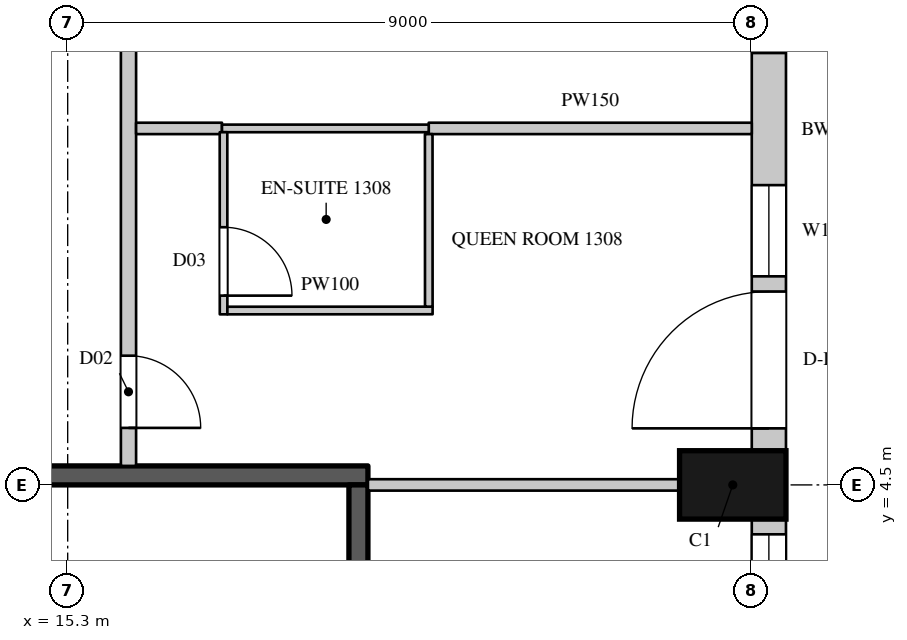
"""IFC4 building model, lengths in metres.
Left out: names, types, materials, properties, quantities, classifications, styles, units other than length and angle.
Written with IfcOpenShell. Run it as: python <this file> out.ifc"""

import sys

from ifc_helpers import new_model, si_unit, direction, frame, frame_2d, origin, origin_2d, place, context, subcontext, project, spatial, rectangle, extrude, element, fill, save


model = new_model("IFC4")
c1 = context("Model", 3, precision=1e-05, world=origin(), true_north=direction((0.0, 1.0)))
c2 = subcontext(c1, "Body", "Model", "MODEL_VIEW")
j1 = project(units=[si_unit("LENGTHUNIT", "METRE"), si_unit("PLANEANGLEUNIT", "RADIAN")], contexts=[c1])
p1 = place(None, origin())
s1 = spatial("IfcSite", under=j1, at=p1, CompositionType="ELEMENT")
p2 = place(p1, origin())
s2 = spatial("IfcBuilding", under=s1, at=p2, CompositionType="ELEMENT")
p3 = place(p2, frame((0.0, 0.0, 77.1)))
s3 = spatial("IfcBuildingStorey", under=s2, at=p3, CompositionType="ELEMENT", Elevation=77.1)
p4 = place(p3, frame((24.05, 4.5, 0.0), z_axis=(0.0, 0.0, 1.0), x_axis=(0.0, 1.0, 0.0)))
e1 = element("IfcColumn", 1, at=p4, inside=s3, PredefinedType="COLUMN", context=c2, shape_type="SweptSolid", body=[
    extrude(rectangle(XDim=0.9, YDim=1.4, at=origin_2d()), origin(), (0.0, 0.0, 1.0), 3.6),
])
p5 = place(p3, frame((24.525, -4.05, 0.0), z_axis=(0.0, 0.0, 1.0), x_axis=(0.0, 1.0, 0.0)))
e2 = element("IfcWall", 2, at=p5, inside=s3, PredefinedType="SOLIDWALL", context=c2, shape_type="SweptSolid", body=[
    extrude(rectangle(XDim=8.1, YDim=0.45, at=frame_2d((4.05, 0.0))), origin(), (0.0, 0.0, 1.0), 3.3),
])
p6 = place(p5, frame((0.2, 0.0, 0.0)))
e3 = element("IfcOpeningElement", 3, at=p6, cuts=e2, PredefinedType="OPENING", context=c2, shape_type="SweptSolid", body=[
    extrude(rectangle(XDim=1.8, YDim=2.4, at=frame_2d((0.9, 1.2))), frame((0.0, 0.235, 0.0), z_axis=(0.0, -1.0, 0.0), x_axis=(1.0, 0.0, 0.0)), (0.0, 0.0, 1.0), 0.47),
])
p7 = place(p5, frame((2.2, 0.0, 1.05)))
e4 = element("IfcOpeningElement", 4, at=p7, cuts=e2, PredefinedType="OPENING", context=c2, shape_type="SweptSolid", body=[
    extrude(rectangle(XDim=1.2, YDim=2.0, at=frame_2d((0.6, 1.0))), frame((0.0, 0.235, 0.0), z_axis=(0.0, -1.0, 0.0), x_axis=(1.0, 0.0, 0.0)), (0.0, 0.0, 1.0), 0.47),
])
p8 = place(p5, frame((4.7, 0.0, 0.0)))
e5 = element("IfcOpeningElement", 5, at=p8, cuts=e2, PredefinedType="OPENING", context=c2, shape_type="SweptSolid", body=[
    extrude(rectangle(XDim=1.8, YDim=2.4, at=frame_2d((0.9, 1.2))), frame((0.0, 0.235, 0.0), z_axis=(0.0, -1.0, 0.0), x_axis=(1.0, 0.0, 0.0)), (0.0, 0.0, 1.0), 0.47),
])
p9 = place(p5, frame((6.7, 0.0, 1.05)))
e6 = element("IfcOpeningElement", 6, at=p9, cuts=e2, PredefinedType="OPENING", context=c2, shape_type="SweptSolid", body=[
    extrude(rectangle(XDim=1.2, YDim=2.0, at=frame_2d((0.6, 1.0))), frame((0.0, 0.235, 0.0), z_axis=(0.0, -1.0, 0.0), x_axis=(1.0, 0.0, 0.0)), (0.0, 0.0, 1.0), 0.47),
])
p10 = place(p3, frame((24.525, 4.95, 0.0), z_axis=(0.0, 0.0, 1.0), x_axis=(0.0, 1.0, 0.0)))
e7 = element("IfcWall", 7, at=p10, inside=s3, PredefinedType="SOLIDWALL", context=c2, shape_type="SweptSolid", body=[
    extrude(rectangle(XDim=8.439, YDim=0.45, at=frame_2d((4.219, 0.0))), origin(), (0.0, 0.0, 1.0), 3.3),
])
p11 = place(p10, frame((0.294, 0.0, 0.0)))
e8 = element("IfcOpeningElement", 8, at=p11, cuts=e7, PredefinedType="OPENING", context=c2, shape_type="SweptSolid", body=[
    extrude(rectangle(XDim=1.8, YDim=2.4, at=frame_2d((0.9, 1.2))), frame((0.0, 0.235, 0.0), z_axis=(0.0, -1.0, 0.0), x_axis=(1.0, 0.0, 0.0)), (0.0, 0.0, 1.0), 0.47),
])
p12 = place(p10, frame((2.294, 0.0, 1.05)))
e9 = element("IfcOpeningElement", 9, at=p12, cuts=e7, PredefinedType="OPENING", context=c2, shape_type="SweptSolid", body=[
    extrude(rectangle(XDim=1.2, YDim=2.0, at=frame_2d((0.6, 1.0))), frame((0.0, 0.235, 0.0), z_axis=(0.0, -1.0, 0.0), x_axis=(1.0, 0.0, 0.0)), (0.0, 0.0, 1.0), 0.47),
])
p13 = place(p10, frame((5.232, 0.0, 1.05)))
e10 = element("IfcOpeningElement", 10, at=p13, cuts=e7, PredefinedType="OPENING", context=c2, shape_type="SweptSolid", body=[
    extrude(rectangle(XDim=2.7, YDim=2.0, at=frame_2d((1.35, 1.0))), frame((0.0, 0.235, 0.0), z_axis=(0.0, -1.0, 0.0), x_axis=(1.0, 0.0, 0.0)), (0.0, 0.0, 1.0), 0.47),
])
p14 = place(p3, frame((16.1, 4.75, 0.0), z_axis=(0.0, 0.0, 1.0), x_axis=(0.0, 1.0, 0.0)))
e11 = element("IfcWall", 11, at=p14, inside=s3, PredefinedType="PARTITIONING", context=c2, shape_type="SweptSolid", body=[
    extrude(rectangle(XDim=12.65, YDim=0.2, at=frame_2d((6.325, 0.0))), origin(), (0.0, 0.0, 1.0), 3.3),
])
p15 = place(p14, frame((0.5, 0.0, 0.0)))
e12 = element("IfcOpeningElement", 12, at=p15, cuts=e11, PredefinedType="OPENING", context=c2, shape_type="SweptSolid", body=[
    extrude(rectangle(XDim=0.95, YDim=2.2, at=frame_2d((0.475, 1.1))), frame((0.0, 0.11, 0.0), z_axis=(0.0, -1.0, 0.0), x_axis=(1.0, 0.0, 0.0)), (0.0, 0.0, 1.0), 0.22),
])
p16 = place(p14, frame((6.9, 0.0, 0.0)))
e13 = element("IfcOpeningElement", 13, at=p16, cuts=e11, PredefinedType="OPENING", context=c2, shape_type="SweptSolid", body=[
    extrude(rectangle(XDim=0.95, YDim=2.2, at=frame_2d((0.475, 1.1))), frame((0.0, 0.11, 0.0), z_axis=(0.0, -1.0, 0.0), x_axis=(1.0, 0.0, 0.0)), (0.0, 0.0, 1.0), 0.22),
])
p17 = place(p3, frame((16.2, 9.19, 0.0), z_axis=(0.0, 0.0, 1.0), x_axis=(1.0, 0.0, 0.0)))
e14 = element("IfcWall", 14, at=p17, inside=s3, PredefinedType="PARTITIONING", context=c2, shape_type="SweptSolid", body=[
    extrude(rectangle(XDim=1.13, YDim=0.15, at=frame_2d((0.565, 0.0))), origin(), (0.0, 0.0, 1.0), 2.65),
])
p18 = place(p3, frame((19.25, 4.5, 0.0), z_axis=(0.0, 0.0, 1.0), x_axis=(1.0, 0.0, 0.0)))
e15 = element("IfcWall", 15, at=p18, inside=s3, PredefinedType="PARTITIONING", context=c2, shape_type="SweptSolid", body=[
    extrude(rectangle(XDim=4.1, YDim=0.15, at=frame_2d((2.05, 0.0))), origin(), (0.0, 0.0, 1.0), 3.3),
])
p19 = place(p3, frame((20.05, 9.19, 0.0), z_axis=(0.0, 0.0, 1.0), x_axis=(1.0, 0.0, 0.0)))
e16 = element("IfcWall", 16, at=p19, inside=s3, PredefinedType="PARTITIONING", context=c2, shape_type="SweptSolid", body=[
    extrude(rectangle(XDim=4.25, YDim=0.15, at=frame_2d((2.125, 0.0))), origin(), (0.0, 0.0, 1.0), 2.65),
])
p20 = place(p3, frame((14.55, 4.625, 0.0), z_axis=(0.0, 0.0, 1.0), x_axis=(1.0, 0.0, 0.0)))
e17 = element("IfcWall", 17, at=p20, inside=s3, PredefinedType="SHEAR", context=c2, shape_type="SweptSolid", body=[
    extrude(rectangle(XDim=4.7, YDim=0.25, at=frame_2d((2.35, 0.0))), origin(), (0.0, 0.0, 1.0), 3.3),
])
p21 = place(p3, frame((19.125, -4.5, 0.0), z_axis=(0.0, 0.0, 1.0), x_axis=(0.0, 1.0, 0.0)))
e18 = element("IfcWall", 18, at=p21, inside=s3, PredefinedType="SHEAR", context=c2, shape_type="SweptSolid", body=[
    extrude(rectangle(XDim=9.0, YDim=0.25, at=frame_2d((4.5, 0.0))), origin(), (0.0, 0.0, 1.0), 3.3),
])
p22 = place(p3, frame((17.33, 9.19, 0.0), z_axis=(0.0, 0.0, 1.0), x_axis=(1.0, 0.0, 0.0)))
e19 = element("IfcWall", 19, at=p22, inside=s3, PredefinedType="PARTITIONING", context=c2, shape_type="SweptSolid", body=[
    extrude(rectangle(XDim=2.72, YDim=0.1, at=frame_2d((1.36, 0.0))), origin(), (0.0, 0.0, 1.0), 2.65),
])
p23 = place(p3, frame((17.35, 9.14, 0.0), z_axis=(0.0, 0.0, 1.0), x_axis=(0.000407580973, -0.999999916939, 0.0)))
e20 = element("IfcWall", 20, at=p23, inside=s3, PredefinedType="PARTITIONING", context=c2, shape_type="SweptSolid", body=[
    extrude(rectangle(XDim=2.396, YDim=0.1, at=frame_2d((1.198, 0.0))), origin(), (0.0, 0.0, 1.0), 3.3),
])
p24 = place(p23, frame((1.25, 0.0, 0.0)))
e21 = element("IfcOpeningElement", 21, at=p24, cuts=e20, PredefinedType="OPENING", context=c2, shape_type="SweptSolid", body=[
    extrude(rectangle(XDim=0.9, YDim=2.2, at=frame_2d((0.45, 1.1))), frame((0.0, 0.06, 0.0), z_axis=(0.0, -1.0, 0.0), x_axis=(1.0, 0.0, 0.0)), (0.0, 0.0, 1.0), 0.12),
])
p25 = place(p3, frame((17.401, 6.794, 0.0), z_axis=(0.0, 0.0, 1.0), x_axis=(0.9999999346, 0.000361663629, 0.0)))
e22 = element("IfcWall", 22, at=p25, inside=s3, PredefinedType="PARTITIONING", context=c2, shape_type="SweptSolid", body=[
    extrude(rectangle(XDim=2.7, YDim=0.1, at=frame_2d((1.35, 0.0))), origin(), (0.0, 0.0, 1.0), 3.3),
])
p26 = place(p3, frame((20.05, 9.115, 0.0), z_axis=(0.0, 0.0, 1.0), x_axis=(0.000430200003, -0.999999907464, 0.0)))
e23 = element("IfcWall", 23, at=p26, inside=s3, PredefinedType="PARTITIONING", context=c2, shape_type="SweptSolid", body=[
    extrude(rectangle(XDim=2.27, YDim=0.1, at=frame_2d((1.135, 0.0))), origin(), (0.0, 0.0, 1.0), 3.3),
])
p27 = place(p9, origin())
e24 = element("IfcWindow", 24, at=p27, inside=s3, PartitioningType="SINGLE_PANEL", PredefinedType="WINDOW", context=c2, shape_type="SweptSolid", body=[
    extrude(rectangle(XDim=1.2, YDim=2.0, at=frame_2d((0.6, 1.0))), frame((0.0, 0.135, 0.0), z_axis=(0.0, -1.0, 0.0), x_axis=(1.0, 0.0, 0.0)), (0.0, 0.0, 1.0), 0.06),
])
fill(e6, e24)
p28 = place(p11, origin())
e25 = element("IfcDoor", 25, at=p28, inside=s3, OperationType="SLIDING_TO_LEFT", PredefinedType="DOOR", context=c2, shape_type="SweptSolid", body=[
    extrude(rectangle(XDim=1.8, YDim=2.4, at=frame_2d((0.9, 1.2))), frame((0.0, 0.13, 0.0), z_axis=(0.0, -1.0, 0.0), x_axis=(1.0, 0.0, 0.0)), (0.0, 0.0, 1.0), 0.05),
])
fill(e8, e25)
p29 = place(p12, origin())
e26 = element("IfcWindow", 26, at=p29, inside=s3, PartitioningType="SINGLE_PANEL", PredefinedType="WINDOW", context=c2, shape_type="SweptSolid", body=[
    extrude(rectangle(XDim=1.2, YDim=2.0, at=frame_2d((0.6, 1.0))), frame((0.0, 0.135, 0.0), z_axis=(0.0, -1.0, 0.0), x_axis=(1.0, 0.0, 0.0)), (0.0, 0.0, 1.0), 0.06),
])
fill(e9, e26)
p30 = place(p13, origin())
e27 = element("IfcWindow", 27, at=p30, inside=s3, PartitioningType="SINGLE_PANEL", PredefinedType="WINDOW", context=c2, shape_type="SweptSolid", body=[
    extrude(rectangle(XDim=2.7, YDim=2.0, at=frame_2d((1.35, 1.0))), frame((0.0, 0.135, 0.0), z_axis=(0.0, -1.0, 0.0), x_axis=(1.0, 0.0, 0.0)), (0.0, 0.0, 1.0), 0.06),
])
fill(e10, e27)
p31 = place(p15, origin())
e28 = element("IfcDoor", 28, at=p31, inside=s3, OperationType="SINGLE_SWING_RIGHT", PredefinedType="DOOR", context=c2, shape_type="SweptSolid", body=[
    extrude(rectangle(XDim=0.95, YDim=2.2, at=frame_2d((0.475, 1.1))), frame((0.0, 0.025, 0.0), z_axis=(0.0, -1.0, 0.0), x_axis=(1.0, 0.0, 0.0)), (0.0, 0.0, 1.0), 0.05),
])
fill(e12, e28)
p32 = place(p24, origin())
e29 = element("IfcDoor", 29, at=p32, inside=s3, OperationType="SINGLE_SWING_RIGHT", PredefinedType="DOOR", context=c2, shape_type="SweptSolid", body=[
    extrude(rectangle(XDim=0.9, YDim=2.2, at=frame_2d((0.45, 1.1))), frame((0.0, 0.025, 0.0), z_axis=(0.0, -1.0, 0.0), x_axis=(1.0, 0.0, 0.0)), (0.0, 0.0, 1.0), 0.05),
])
fill(e21, e29)
save(model, sys.argv[1])
